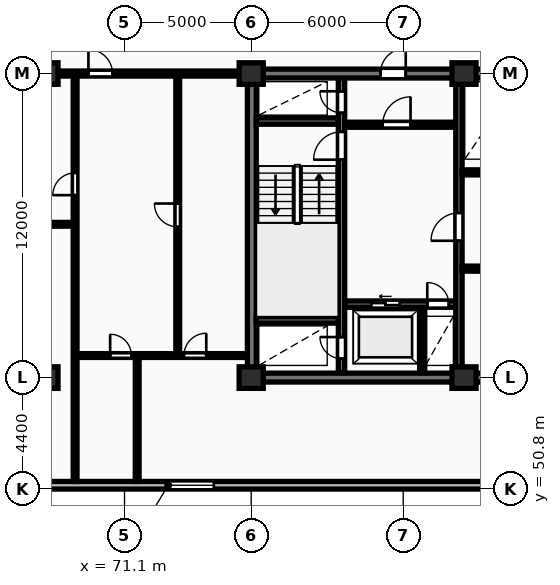
"""IFC4 building model, lengths in metres.
Left out: names, types, materials, properties, quantities, classifications, styles, units other than length and angle.
Written with IfcOpenShell. Run it as: python <this file> out.ifc"""

import sys

from ifc_helpers import new_model, si_unit, direction, frame, frame_2d, origin, origin_2d, place, context, subcontext, project, spatial, rectangle, extrude, element, fill, save


model = new_model("IFC4")
c1 = context("Model", 3, precision=1e-05, world=origin(), true_north=direction((0.0, 1.0)))
c2 = subcontext(c1, "Body", "Model", "MODEL_VIEW")
j1 = project(units=[si_unit("LENGTHUNIT", "METRE"), si_unit("PLANEANGLEUNIT", "RADIAN")], contexts=[c1])
p1 = place(None, origin())
s1 = spatial("IfcSite", under=j1, at=p1, CompositionType="ELEMENT")
p2 = place(p1, origin())
s2 = spatial("IfcBuilding", under=s1, at=p2, CompositionType="ELEMENT")
p3 = place(p2, frame((0.0, 0.0, 100.3)))
s3 = spatial("IfcBuildingStorey", under=s2, at=p3, CompositionType="ELEMENT", Elevation=100.3)
for number, where, z_axis, x_axis in (
    (1, (68.0, 55.2, 0.0), (0.0, 0.0, 1.0), (1.0, 0.0, 0.0)),
    (2, (68.0, 67.2, 0.0), (0.0, 0.0, 1.0), (1.0, 0.0, 0.0)),
    (3, (76.1, 55.2, 0.0), (0.0, 0.0, 1.0), (1.0, 0.0, 0.0)),
    (4, (76.1, 67.2, 0.0), (0.0, 0.0, 1.0), (1.0, 0.0, 0.0)),
    (5, (84.5, 55.2, 0.0), (0.0, 0.0, 1.0), (1.0, 0.0, 0.0)),
    (6, (84.5, 67.2, 0.0), (0.0, 0.0, 1.0), (1.0, 0.0, 0.0)),
):
    element("IfcColumn", number, at=place(p3, frame(where, z_axis=z_axis, x_axis=x_axis)), inside=s3, PredefinedType="COLUMN", context=c2, shape_type="SweptSolid", body=[
        extrude(rectangle(XDim=0.95, YDim=0.85, at=origin_2d()), origin(), (0.0, 0.0, 1.0), 3.25),
    ])
p4 = place(p3, frame((57.6, 50.95, 0.0), z_axis=(0.0, 0.0, 1.0), x_axis=(1.0, 0.0, 0.0)))
e7 = element("IfcWall", 7, at=p4, inside=s3, PredefinedType="STANDARD", context=c2, shape_type="SweptSolid", body=[
    extrude(rectangle(XDim=73.0, YDim=0.3, at=frame_2d((36.5, 0.0))), origin(), (0.0, 0.0, 1.0), 2.97),
])
p5 = place(p4, frame((15.225, 0.0, 0.85)))
e8 = element("IfcOpeningElement", 8, at=p5, cuts=e7, PredefinedType="OPENING", context=c2, shape_type="SweptSolid", body=[
    extrude(rectangle(XDim=1.8, YDim=1.8, at=frame_2d((0.9, 0.9))), frame((0.0, 0.16, 0.0), z_axis=(0.0, -1.0, 0.0), x_axis=(1.0, 0.0, 0.0)), (0.0, 0.0, 1.0), 0.32),
])
p6 = place(p4, frame((58.575, 0.0, 0.85)))
e9 = element("IfcOpeningElement", 9, at=p6, cuts=e7, PredefinedType="OPENING", context=c2, shape_type="SweptSolid", body=[
    extrude(rectangle(XDim=1.8, YDim=1.8, at=frame_2d((0.9, 0.9))), frame((0.0, 0.16, 0.0), z_axis=(0.0, -1.0, 0.0), x_axis=(1.0, 0.0, 0.0)), (0.0, 0.0, 1.0), 0.32),
])
p7 = place(p3, frame((75.95, 55.2, 0.0), z_axis=(0.0, 0.0, 1.0), x_axis=(1.0, 0.0, 0.0)))
e10 = element("IfcWall", 10, at=p7, inside=s3, PredefinedType="SHEAR", context=c2, shape_type="SweptSolid", body=[
    extrude(rectangle(XDim=36.3, YDim=0.35, at=frame_2d((18.15, 0.0))), origin(), (0.0, 0.0, 1.0), 3.25),
])
p8 = place(p3, frame((76.125, 55.375, 0.0), z_axis=(0.0, 0.0, 1.0), x_axis=(0.0, 1.0, 0.0)))
e11 = element("IfcWall", 11, at=p8, inside=s3, PredefinedType="SHEAR", context=c2, shape_type="SweptSolid", body=[
    extrude(rectangle(XDim=11.65, YDim=0.35, at=frame_2d((5.825, 0.0))), origin(), (0.0, 0.0, 1.0), 3.25),
])
p9 = place(p3, frame((75.95, 67.2, 0.0), z_axis=(0.0, 0.0, 1.0), x_axis=(1.0, 0.0, 0.0)))
e12 = element("IfcWall", 12, at=p9, inside=s3, PredefinedType="SHEAR", context=c2, shape_type="SweptSolid", body=[
    extrude(rectangle(XDim=36.3, YDim=0.35, at=frame_2d((18.15, 0.0))), origin(), (0.0, 0.0, 1.0), 3.25),
])
p10 = place(p9, frame((5.25, 0.0, 0.0)))
e13 = element("IfcOpeningElement", 13, at=p10, cuts=e12, PredefinedType="OPENING", context=c2, shape_type="SweptSolid", body=[
    extrude(rectangle(XDim=1.0, YDim=2.15, at=frame_2d((0.5, 1.075))), frame((0.0, 0.185, 0.0), z_axis=(0.0, -1.0, 0.0), x_axis=(1.0, 0.0, 0.0)), (0.0, 0.0, 1.0), 0.37),
])
p11 = place(p9, frame((21.6, 0.0, 0.0)))
e14 = element("IfcOpeningElement", 14, at=p11, cuts=e12, PredefinedType="OPENING", context=c2, shape_type="SweptSolid", body=[
    extrude(rectangle(XDim=1.5, YDim=2.2, at=frame_2d((0.75, 1.1))), frame((0.0, 0.185, 0.0), z_axis=(0.0, -1.0, 0.0), x_axis=(1.0, 0.0, 0.0)), (0.0, 0.0, 1.0), 0.37),
])
p12 = place(p9, frame((30.45, 0.0, 0.0)))
e15 = element("IfcOpeningElement", 15, at=p12, cuts=e12, PredefinedType="OPENING", context=c2, shape_type="SweptSolid", body=[
    extrude(rectangle(XDim=1.0, YDim=2.15, at=frame_2d((0.5, 1.075))), frame((0.0, 0.185, 0.0), z_axis=(0.0, -1.0, 0.0), x_axis=(1.0, 0.0, 0.0)), (0.0, 0.0, 1.0), 0.37),
])
p13 = place(p3, frame((79.665, 55.4, 0.0), z_axis=(0.0, 0.0, 1.0), x_axis=(0.0, 1.0, 0.0)))
e16 = element("IfcWall", 16, at=p13, inside=s3, PredefinedType="SHEAR", context=c2, shape_type="SweptSolid", body=[
    extrude(rectangle(XDim=11.6, YDim=0.25, at=frame_2d((5.8, 0.0))), origin(), (0.0, 0.0, 1.0), 3.25),
])
p14 = place(p13, frame((0.55, 0.0, 0.0)))
e17 = element("IfcOpeningElement", 17, at=p14, cuts=e16, PredefinedType="OPENING", context=c2, shape_type="SweptSolid", body=[
    extrude(rectangle(XDim=0.85, YDim=2.05, at=frame_2d((0.425, 1.025))), frame((0.0, 0.135, 0.0), z_axis=(0.0, -1.0, 0.0), x_axis=(1.0, 0.0, 0.0)), (0.0, 0.0, 1.0), 0.27),
])
p15 = place(p13, frame((8.4, 0.0, 0.0)))
e18 = element("IfcOpeningElement", 18, at=p15, cuts=e16, PredefinedType="OPENING", context=c2, shape_type="SweptSolid", body=[
    extrude(rectangle(XDim=1.1, YDim=2.1, at=frame_2d((0.55, 1.05))), frame((0.0, 0.135, 0.0), z_axis=(0.0, -1.0, 0.0), x_axis=(1.0, 0.0, 0.0)), (0.0, 0.0, 1.0), 0.27),
])
p16 = place(p13, frame((10.25, 0.0, 0.0)))
e19 = element("IfcOpeningElement", 19, at=p16, cuts=e16, PredefinedType="OPENING", context=c2, shape_type="SweptSolid", body=[
    extrude(rectangle(XDim=0.85, YDim=2.05, at=frame_2d((0.425, 1.025))), frame((0.0, 0.135, 0.0), z_axis=(0.0, -1.0, 0.0), x_axis=(1.0, 0.0, 0.0)), (0.0, 0.0, 1.0), 0.27),
])
for number, where, z_axis, x_axis in (
    (20, (76.3, 57.475, 0.0), (0.0, 0.0, 1.0), (1.0, 0.0, 0.0)),
    (21, (76.3, 65.325, 0.0), (0.0, 0.0, 1.0), (1.0, 0.0, 0.0)),
):
    element("IfcWall", number, at=place(p3, frame(where, z_axis=z_axis, x_axis=x_axis)), inside=s3, PredefinedType="SHEAR", context=c2, shape_type="SweptSolid", body=[
        extrude(rectangle(XDim=3.24, YDim=0.25, at=frame_2d((1.62, 0.0))), origin(), (0.0, 0.0, 1.0), 3.25),
    ])
p17 = place(p3, frame((79.79, 58.1, 0.0), z_axis=(0.0, 0.0, 1.0), x_axis=(1.0, 0.0, 0.0)))
e22 = element("IfcWall", 22, at=p17, inside=s3, PredefinedType="SHEAR", context=c2, shape_type="SweptSolid", body=[
    extrude(rectangle(XDim=4.39, YDim=0.25, at=frame_2d((2.195, 0.0))), origin(), (0.0, 0.0, 1.0), 3.25),
])
p18 = place(p17, frame((1.05, 0.0, 0.0)))
e23 = element("IfcOpeningElement", 23, at=p18, cuts=e22, PredefinedType="OPENING", context=c2, shape_type="SweptSolid", body=[
    extrude(rectangle(XDim=1.12, YDim=2.12, at=frame_2d((0.56, 1.06))), frame((0.0, 0.135, 0.0), z_axis=(0.0, -1.0, 0.0), x_axis=(1.0, 0.0, 0.0)), (0.0, 0.0, 1.0), 0.27),
])
p19 = place(p17, frame((3.26, 0.0, 0.0)))
e24 = element("IfcOpeningElement", 24, at=p19, cuts=e22, PredefinedType="OPENING", context=c2, shape_type="SweptSolid", body=[
    extrude(rectangle(XDim=0.85, YDim=2.05, at=frame_2d((0.425, 1.025))), frame((0.0, 0.135, 0.0), z_axis=(0.0, -1.0, 0.0), x_axis=(1.0, 0.0, 0.0)), (0.0, 0.0, 1.0), 0.27),
])
p20 = place(p3, frame((82.85, 55.4, 0.0), z_axis=(0.0, 0.0, 1.0), x_axis=(0.0, 1.0, 0.0)))
e25 = element("IfcWall", 25, at=p20, inside=s3, PredefinedType="PARTITIONING", context=c2, shape_type="SweptSolid", body=[
    extrude(rectangle(XDim=2.56, YDim=0.2, at=frame_2d((1.28, 0.0))), origin(), (0.0, 0.0, 1.0), 2.97),
])
p21 = place(p3, frame((79.79, 65.18, 0.0), z_axis=(0.0, 0.0, 1.0), x_axis=(1.0, 0.0, 0.0)))
e26 = element("IfcWall", 26, at=p21, inside=s3, PredefinedType="PARTITIONING", context=c2, shape_type="SweptSolid", body=[
    extrude(rectangle(XDim=4.39, YDim=0.2, at=frame_2d((2.195, 0.0))), origin(), (0.0, 0.0, 1.0), 2.97),
])
p22 = place(p21, frame((1.5, 0.0, 0.0)))
e27 = element("IfcOpeningElement", 27, at=p22, cuts=e26, PredefinedType="OPENING", context=c2, shape_type="SweptSolid", body=[
    extrude(rectangle(XDim=1.1, YDim=2.1, at=frame_2d((0.55, 1.05))), frame((0.0, 0.11, 0.0), z_axis=(0.0, -1.0, 0.0), x_axis=(1.0, 0.0, 0.0)), (0.0, 0.0, 1.0), 0.22),
])
p23 = place(p3, frame((84.3, 55.4, 0.0), z_axis=(0.0, 0.0, 1.0), x_axis=(0.0, 1.0, 0.0)))
e28 = element("IfcWall", 28, at=p23, inside=s3, PredefinedType="SHEAR", context=c2, shape_type="SweptSolid", body=[
    extrude(rectangle(XDim=11.6, YDim=0.25, at=frame_2d((5.8, 0.0))), origin(), (0.0, 0.0, 1.0), 3.25),
])
p24 = place(p23, frame((5.2, 0.0, 0.0)))
e29 = element("IfcOpeningElement", 29, at=p24, cuts=e28, PredefinedType="OPENING", context=c2, shape_type="SweptSolid", body=[
    extrude(rectangle(XDim=1.1, YDim=2.1, at=frame_2d((0.55, 1.05))), frame((0.0, 0.135, 0.0), z_axis=(0.0, -1.0, 0.0), x_axis=(1.0, 0.0, 0.0)), (0.0, 0.0, 1.0), 0.27),
])
p25 = place(p3, frame((84.42, 59.5, 0.0), z_axis=(0.0, 0.0, 1.0), x_axis=(1.0, 0.0, 0.0)))
e30 = element("IfcWall", 30, at=p25, inside=s3, PredefinedType="PARTITIONING", context=c2, shape_type="SweptSolid", body=[
    extrude(rectangle(XDim=8.36, YDim=0.2, at=frame_2d((4.18, 0.0))), origin(), (0.0, 0.0, 1.0), 2.97),
])
p26 = place(p25, frame((3.4, 0.0, 0.0)))
e31 = element("IfcOpeningElement", 31, at=p26, cuts=e30, PredefinedType="OPENING", context=c2, shape_type="SweptSolid", body=[
    extrude(rectangle(XDim=0.92, YDim=2.08, at=frame_2d((0.46, 1.04))), frame((0.0, 0.11, 0.0), z_axis=(0.0, -1.0, 0.0), x_axis=(1.0, 0.0, 0.0)), (0.0, 0.0, 1.0), 0.22),
])
p27 = place(p3, frame((84.42, 63.3, 0.0), z_axis=(0.0, 0.0, 1.0), x_axis=(1.0, 0.0, 0.0)))
e32 = element("IfcWall", 32, at=p27, inside=s3, PredefinedType="PARTITIONING", context=c2, shape_type="SweptSolid", body=[
    extrude(rectangle(XDim=19.83, YDim=0.2, at=frame_2d((9.915, 0.0))), origin(), (0.0, 0.0, 1.0), 2.97),
])
p28 = place(p27, frame((1.15, 0.0, 0.0)))
e33 = element("IfcOpeningElement", 33, at=p28, cuts=e32, PredefinedType="OPENING", context=c2, shape_type="SweptSolid", body=[
    extrude(rectangle(XDim=0.85, YDim=2.05, at=frame_2d((0.425, 1.025))), frame((0.0, 0.11, 0.0), z_axis=(0.0, -1.0, 0.0), x_axis=(1.0, 0.0, 0.0)), (0.0, 0.0, 1.0), 0.22),
])
p29 = place(p27, frame((3.25, 0.0, 0.0)))
e34 = element("IfcOpeningElement", 34, at=p29, cuts=e32, PredefinedType="OPENING", context=c2, shape_type="SweptSolid", body=[
    extrude(rectangle(XDim=0.85, YDim=2.05, at=frame_2d((0.425, 1.025))), frame((0.0, 0.11, 0.0), z_axis=(0.0, -1.0, 0.0), x_axis=(1.0, 0.0, 0.0)), (0.0, 0.0, 1.0), 0.22),
])
p30 = place(p27, frame((13.08, 0.0, 0.0)))
e35 = element("IfcOpeningElement", 35, at=p30, cuts=e32, PredefinedType="OPENING", context=c2, shape_type="SweptSolid", body=[
    extrude(rectangle(XDim=1.5, YDim=2.2, at=frame_2d((0.75, 1.1))), frame((0.0, 0.11, 0.0), z_axis=(0.0, -1.0, 0.0), x_axis=(1.0, 0.0, 0.0)), (0.0, 0.0, 1.0), 0.22),
])
p31 = place(p27, frame((5.53, 0.0, 0.0)))
e36 = element("IfcOpeningElement", 36, at=p31, cuts=e32, PredefinedType="OPENING", context=c2, shape_type="SweptSolid", body=[
    extrude(rectangle(XDim=0.88, YDim=2.06, at=frame_2d((0.44, 1.03))), frame((0.0, 0.11, 0.0), z_axis=(0.0, -1.0, 0.0), x_axis=(1.0, 0.0, 0.0)), (0.0, 0.0, 1.0), 0.22),
])
p32 = place(p27, frame((7.68, 0.0, 0.0)))
e37 = element("IfcOpeningElement", 37, at=p32, cuts=e32, PredefinedType="OPENING", context=c2, shape_type="SweptSolid", body=[
    extrude(rectangle(XDim=0.88, YDim=2.06, at=frame_2d((0.44, 1.03))), frame((0.0, 0.11, 0.0), z_axis=(0.0, -1.0, 0.0), x_axis=(1.0, 0.0, 0.0)), (0.0, 0.0, 1.0), 0.22),
])
p33 = place(p27, frame((10.43, 0.0, 0.0)))
e38 = element("IfcOpeningElement", 38, at=p33, cuts=e32, PredefinedType="OPENING", context=c2, shape_type="SweptSolid", body=[
    extrude(rectangle(XDim=0.85, YDim=2.05, at=frame_2d((0.425, 1.025))), frame((0.0, 0.11, 0.0), z_axis=(0.0, -1.0, 0.0), x_axis=(1.0, 0.0, 0.0)), (0.0, 0.0, 1.0), 0.22),
])
p34 = place(p27, frame((16.23, 0.0, 0.0)))
e39 = element("IfcOpeningElement", 39, at=p34, cuts=e32, PredefinedType="OPENING", context=c2, shape_type="SweptSolid", body=[
    extrude(rectangle(XDim=0.96, YDim=2.1, at=frame_2d((0.48, 1.05))), frame((0.0, 0.11, 0.0), z_axis=(0.0, -1.0, 0.0), x_axis=(1.0, 0.0, 0.0)), (0.0, 0.0, 1.0), 0.22),
])
p35 = place(p27, frame((18.68, 0.0, 0.0)))
e40 = element("IfcOpeningElement", 40, at=p35, cuts=e32, PredefinedType="OPENING", context=c2, shape_type="SweptSolid", body=[
    extrude(rectangle(XDim=0.84, YDim=2.04, at=frame_2d((0.42, 1.02))), frame((0.0, 0.11, 0.0), z_axis=(0.0, -1.0, 0.0), x_axis=(1.0, 0.0, 0.0)), (0.0, 0.0, 1.0), 0.22),
])
p36 = place(p3, frame((57.6, 61.25, 0.0), z_axis=(0.0, 0.0, 1.0), x_axis=(1.0, 0.0, 0.0)))
e41 = element("IfcWall", 41, at=p36, inside=s3, PredefinedType="PARTITIONING", context=c2, shape_type="SweptSolid", body=[
    extrude(rectangle(XDim=11.55, YDim=0.15, at=frame_2d((5.775, 0.0))), origin(), (0.0, 0.0, 1.0), 2.97),
])
p37 = place(p36, frame((5.355, 0.0, 0.0)))
e42 = element("IfcOpeningElement", 42, at=p37, cuts=e41, PredefinedType="OPENING", context=c2, shape_type="SweptSolid", body=[
    extrude(rectangle(XDim=0.84, YDim=2.04, at=frame_2d((0.42, 1.02))), frame((0.0, 0.085, 0.0), z_axis=(0.0, -1.0, 0.0), x_axis=(1.0, 0.0, 0.0)), (0.0, 0.0, 1.0), 0.17),
])
p38 = place(p3, frame((69.15, 51.1, 0.0), z_axis=(0.0, 0.0, 1.0), x_axis=(0.0, 1.0, 0.0)))
e43 = element("IfcWall", 43, at=p38, inside=s3, PredefinedType="PARTITIONING", context=c2, shape_type="SweptSolid", body=[
    extrude(rectangle(XDim=16.05, YDim=0.15, at=frame_2d((8.025, 0.0))), origin(), (0.0, 0.0, 1.0), 2.97),
])
p39 = place(p38, frame((11.3, 0.0, 0.0)))
e44 = element("IfcOpeningElement", 44, at=p39, cuts=e43, PredefinedType="OPENING", context=c2, shape_type="SweptSolid", body=[
    extrude(rectangle(XDim=0.88, YDim=2.06, at=frame_2d((0.44, 1.03))), frame((0.0, 0.085, 0.0), z_axis=(0.0, -1.0, 0.0), x_axis=(1.0, 0.0, 0.0)), (0.0, 0.0, 1.0), 0.17),
])
p40 = place(p3, frame((73.2, 56.07, 0.0), z_axis=(0.0, 0.0, 1.0), x_axis=(0.0, 1.0, 0.0)))
e45 = element("IfcWall", 45, at=p40, inside=s3, PredefinedType="PARTITIONING", context=c2, shape_type="SweptSolid", body=[
    extrude(rectangle(XDim=11.08, YDim=0.15, at=frame_2d((5.54, 0.0))), origin(), (0.0, 0.0, 1.0), 2.97),
])
p41 = place(p40, frame((5.08, 0.0, 0.0)))
e46 = element("IfcOpeningElement", 46, at=p41, cuts=e45, PredefinedType="OPENING", context=c2, shape_type="SweptSolid", body=[
    extrude(rectangle(XDim=0.92, YDim=2.08, at=frame_2d((0.46, 1.04))), frame((0.0, 0.085, 0.0), z_axis=(0.0, -1.0, 0.0), x_axis=(1.0, 0.0, 0.0)), (0.0, 0.0, 1.0), 0.17),
])
p42 = place(p3, frame((71.6, 51.1, 0.0), z_axis=(0.0, 0.0, 1.0), x_axis=(0.0, 1.0, 0.0)))
e47 = element("IfcWall", 47, at=p42, inside=s3, PredefinedType="PARTITIONING", context=c2, shape_type="SweptSolid", body=[
    extrude(rectangle(XDim=4.97, YDim=0.15, at=frame_2d((2.485, 0.0))), origin(), (0.0, 0.0, 1.0), 2.97),
])
p43 = place(p3, frame((69.17, 56.07, 0.0), z_axis=(0.0, 0.0, 1.0), x_axis=(1.0, 0.0, 0.0)))
e48 = element("IfcWall", 48, at=p43, inside=s3, PredefinedType="PARTITIONING", context=c2, shape_type="SweptSolid", body=[
    extrude(rectangle(XDim=6.76, YDim=0.15, at=frame_2d((3.38, 0.0))), origin(), (0.0, 0.0, 1.0), 2.97),
])
p44 = place(p43, frame((1.362, 0.0, 0.0)))
e49 = element("IfcOpeningElement", 49, at=p44, cuts=e48, PredefinedType="OPENING", context=c2, shape_type="SweptSolid", body=[
    extrude(rectangle(XDim=0.84, YDim=2.04, at=frame_2d((0.42, 1.02))), frame((0.0, 0.085, 0.0), z_axis=(0.0, -1.0, 0.0), x_axis=(1.0, 0.0, 0.0)), (0.0, 0.0, 1.0), 0.17),
])
p45 = place(p43, frame((4.277, 0.0, 0.0)))
e50 = element("IfcOpeningElement", 50, at=p45, cuts=e48, PredefinedType="OPENING", context=c2, shape_type="SweptSolid", body=[
    extrude(rectangle(XDim=0.88, YDim=2.06, at=frame_2d((0.44, 1.03))), frame((0.0, 0.085, 0.0), z_axis=(0.0, -1.0, 0.0), x_axis=(1.0, 0.0, 0.0)), (0.0, 0.0, 1.0), 0.17),
])
p46 = place(p3, frame((57.6, 67.2, 0.0), z_axis=(0.0, 0.0, 1.0), x_axis=(1.0, 0.0, 0.0)))
e51 = element("IfcWall", 51, at=p46, inside=s3, PredefinedType="PARTITIONING", context=c2, shape_type="SweptSolid", body=[
    extrude(rectangle(XDim=18.35, YDim=0.2, at=frame_2d((9.175, 0.0))), origin(), (0.0, 0.0, 1.0), 2.433),
])
p47 = place(p46, frame((12.075, 0.0, 0.0)))
e52 = element("IfcOpeningElement", 52, at=p47, cuts=e51, PredefinedType="OPENING", context=c2, shape_type="SweptSolid", body=[
    extrude(rectangle(XDim=0.95, YDim=2.15, at=frame_2d((0.475, 1.075))), frame((0.0, 0.11, 0.0), z_axis=(0.0, -1.0, 0.0), x_axis=(1.0, 0.0, 0.0)), (0.0, 0.0, 1.0), 0.22),
])
p48 = place(p5, origin())
e53 = element("IfcWindow", 53, at=p48, inside=s3, PartitioningType="SINGLE_PANEL", PredefinedType="WINDOW", context=c2, shape_type="SweptSolid", body=[
    extrude(rectangle(XDim=1.8, YDim=1.8, at=frame_2d((0.9, 0.9))), frame((0.0, 0.03, 0.0), z_axis=(0.0, -1.0, 0.0), x_axis=(1.0, 0.0, 0.0)), (0.0, 0.0, 1.0), 0.06),
])
fill(e8, e53)
p49 = place(p10, origin())
e54 = element("IfcDoor", 54, at=p49, inside=s3, OperationType="SINGLE_SWING_RIGHT", PredefinedType="DOOR", context=c2, shape_type="SweptSolid", body=[
    extrude(rectangle(XDim=1.0, YDim=2.15, at=frame_2d((0.5, 1.075))), frame((0.0, 0.025, 0.0), z_axis=(0.0, -1.0, 0.0), x_axis=(1.0, 0.0, 0.0)), (0.0, 0.0, 1.0), 0.05),
])
fill(e13, e54)
p50 = place(p14, origin())
e55 = element("IfcDoor", 55, at=p50, inside=s3, OperationType="SINGLE_SWING_RIGHT", PredefinedType="DOOR", context=c2, shape_type="SweptSolid", body=[
    extrude(rectangle(XDim=0.85, YDim=2.05, at=frame_2d((0.425, 1.025))), frame((0.0, 0.025, 0.0), z_axis=(0.0, -1.0, 0.0), x_axis=(1.0, 0.0, 0.0)), (0.0, 0.0, 1.0), 0.05),
])
fill(e17, e55)
p51 = place(p15, origin())
e56 = element("IfcDoor", 56, at=p51, inside=s3, OperationType="SINGLE_SWING_LEFT", PredefinedType="DOOR", context=c2, shape_type="SweptSolid", body=[
    extrude(rectangle(XDim=1.1, YDim=2.1, at=frame_2d((0.55, 1.05))), frame((0.0, 0.025, 0.0), z_axis=(0.0, -1.0, 0.0), x_axis=(1.0, 0.0, 0.0)), (0.0, 0.0, 1.0), 0.05),
])
fill(e18, e56)
p52 = place(p16, origin())
e57 = element("IfcDoor", 57, at=p52, inside=s3, OperationType="SINGLE_SWING_RIGHT", PredefinedType="DOOR", context=c2, shape_type="SweptSolid", body=[
    extrude(rectangle(XDim=0.85, YDim=2.05, at=frame_2d((0.425, 1.025))), frame((0.0, 0.025, 0.0), z_axis=(0.0, -1.0, 0.0), x_axis=(1.0, 0.0, 0.0)), (0.0, 0.0, 1.0), 0.05),
])
fill(e19, e57)
p53 = place(p18, origin())
e58 = element("IfcDoor", 58, at=p53, inside=s3, OperationType="SLIDING_TO_LEFT", PredefinedType="DOOR", context=c2, shape_type="SweptSolid", body=[
    extrude(rectangle(XDim=1.12, YDim=2.12, at=frame_2d((0.56, 1.06))), frame((0.0, 0.025, 0.0), z_axis=(0.0, -1.0, 0.0), x_axis=(1.0, 0.0, 0.0)), (0.0, 0.0, 1.0), 0.05),
])
fill(e23, e58)
p54 = place(p19, origin())
e59 = element("IfcDoor", 59, at=p54, inside=s3, OperationType="SINGLE_SWING_LEFT", PredefinedType="DOOR", context=c2, shape_type="SweptSolid", body=[
    extrude(rectangle(XDim=0.85, YDim=2.05, at=frame_2d((0.425, 1.025))), frame((0.0, 0.025, 0.0), z_axis=(0.0, -1.0, 0.0), x_axis=(1.0, 0.0, 0.0)), (0.0, 0.0, 1.0), 0.05),
])
fill(e24, e59)
p55 = place(p22, origin())
e60 = element("IfcDoor", 60, at=p55, inside=s3, OperationType="SINGLE_SWING_RIGHT", PredefinedType="DOOR", context=c2, shape_type="SweptSolid", body=[
    extrude(rectangle(XDim=1.1, YDim=2.1, at=frame_2d((0.55, 1.05))), frame((0.0, 0.025, 0.0), z_axis=(0.0, -1.0, 0.0), x_axis=(1.0, 0.0, 0.0)), (0.0, 0.0, 1.0), 0.05),
])
fill(e27, e60)
p56 = place(p24, origin())
e61 = element("IfcDoor", 61, at=p56, inside=s3, OperationType="SINGLE_SWING_LEFT", PredefinedType="DOOR", context=c2, shape_type="SweptSolid", body=[
    extrude(rectangle(XDim=1.1, YDim=2.1, at=frame_2d((0.55, 1.05))), frame((0.0, 0.025, 0.0), z_axis=(0.0, -1.0, 0.0), x_axis=(1.0, 0.0, 0.0)), (0.0, 0.0, 1.0), 0.05),
])
fill(e29, e61)
p57 = place(p39, origin())
e62 = element("IfcDoor", 62, at=p57, inside=s3, OperationType="SINGLE_SWING_LEFT", PredefinedType="DOOR", context=c2, shape_type="SweptSolid", body=[
    extrude(rectangle(XDim=0.88, YDim=2.06, at=frame_2d((0.44, 1.03))), frame((0.0, 0.025, 0.0), z_axis=(0.0, -1.0, 0.0), x_axis=(1.0, 0.0, 0.0)), (0.0, 0.0, 1.0), 0.05),
])
fill(e44, e62)
p58 = place(p41, origin())
e63 = element("IfcDoor", 63, at=p58, inside=s3, OperationType="SINGLE_SWING_RIGHT", PredefinedType="DOOR", context=c2, shape_type="SweptSolid", body=[
    extrude(rectangle(XDim=0.92, YDim=2.08, at=frame_2d((0.46, 1.04))), frame((0.0, 0.025, 0.0), z_axis=(0.0, -1.0, 0.0), x_axis=(1.0, 0.0, 0.0)), (0.0, 0.0, 1.0), 0.05),
])
fill(e46, e63)
p59 = place(p44, origin())
e64 = element("IfcDoor", 64, at=p59, inside=s3, OperationType="SINGLE_SWING_LEFT", PredefinedType="DOOR", context=c2, shape_type="SweptSolid", body=[
    extrude(rectangle(XDim=0.84, YDim=2.04, at=frame_2d((0.42, 1.02))), frame((0.0, 0.025, 0.0), z_axis=(0.0, -1.0, 0.0), x_axis=(1.0, 0.0, 0.0)), (0.0, 0.0, 1.0), 0.05),
])
fill(e49, e64)
p60 = place(p45, origin())
e65 = element("IfcDoor", 65, at=p60, inside=s3, OperationType="SINGLE_SWING_RIGHT", PredefinedType="DOOR", context=c2, shape_type="SweptSolid", body=[
    extrude(rectangle(XDim=0.88, YDim=2.06, at=frame_2d((0.44, 1.03))), frame((0.0, 0.025, 0.0), z_axis=(0.0, -1.0, 0.0), x_axis=(1.0, 0.0, 0.0)), (0.0, 0.0, 1.0), 0.05),
])
fill(e50, e65)
p61 = place(p47, origin())
e66 = element("IfcDoor", 66, at=p61, inside=s3, OperationType="SINGLE_SWING_LEFT", PredefinedType="DOOR", context=c2, shape_type="SweptSolid", body=[
    extrude(rectangle(XDim=0.95, YDim=2.15, at=frame_2d((0.475, 1.075))), frame((0.0, 0.025, 0.0), z_axis=(0.0, -1.0, 0.0), x_axis=(1.0, 0.0, 0.0)), (0.0, 0.0, 1.0), 0.05),
])
fill(e52, e66)
save(model, sys.argv[1])
